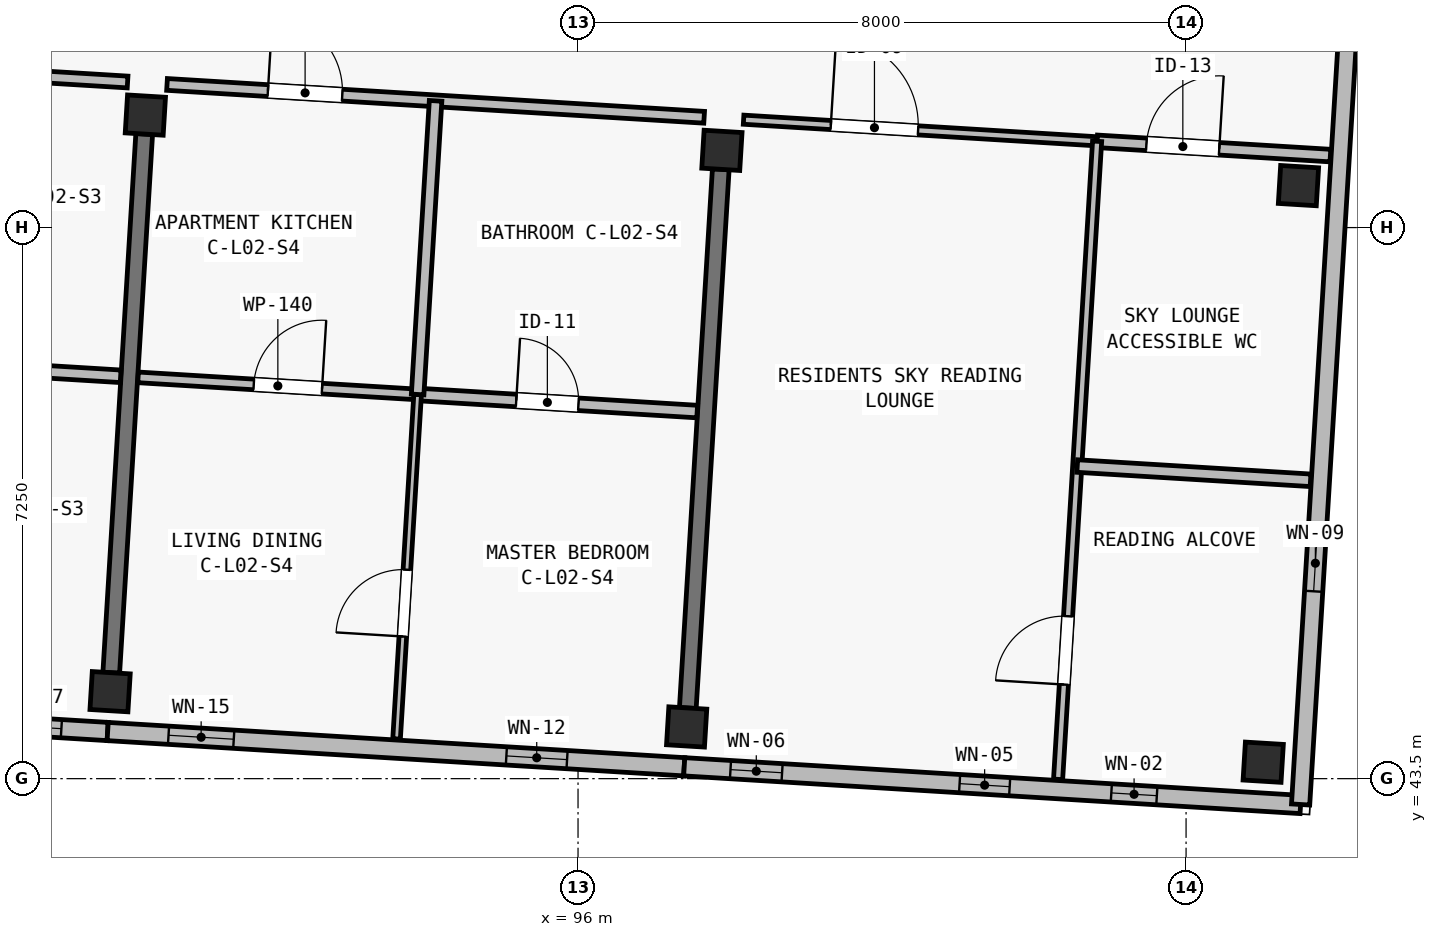
"""IFC4 building model, lengths in metres.
Left out: names, types, materials, properties, quantities, classifications, styles, units other than length and angle.
Written with IfcOpenShell. Run it as: python <this file> out.ifc"""

import sys

from ifc_helpers import new_model, si_unit, direction, frame, frame_2d, origin, origin_2d, place, context, subcontext, project, spatial, rectangle, extrude, element, fill, save


model = new_model("IFC4")
c1 = context("Model", 3, precision=1e-05, world=origin(), true_north=direction((0.0, 1.0)))
c2 = subcontext(c1, "Body", "Model", "MODEL_VIEW")
j1 = project(units=[si_unit("LENGTHUNIT", "METRE"), si_unit("PLANEANGLEUNIT", "RADIAN")], contexts=[c1])
p1 = place(None, origin())
s1 = spatial("IfcSite", under=j1, at=p1, CompositionType="ELEMENT")
p2 = place(p1, origin())
s2 = spatial("IfcBuilding", under=s1, at=p2, CompositionType="ELEMENT")
p3 = place(p2, frame((0.0, 0.0, 8.4)))
s3 = spatial("IfcBuildingStorey", under=s2, at=p3, CompositionType="ELEMENT", Elevation=8.4)
for number, where, z_axis, x_axis in (
    (1, (89.843, 44.644, 0.0), (0.0, 0.0, 1.0), (0.998, -0.061, 0.0)),
    (2, (90.307, 52.23, 0.0), (0.0, 0.0, 1.0), (0.998, -0.061, 0.0)),
    (3, (97.429, 44.18, 0.0), (0.0, 0.0, 1.0), (0.998, -0.061, 0.0)),
    (4, (97.893, 51.766, 0.0), (0.0, 0.0, 1.0), (0.998, -0.061, 0.0)),
    (5, (105.015, 43.716, 0.0), (0.0, 0.0, 1.0), (0.998, -0.061, 0.0)),
    (6, (105.479, 51.302, 0.0), (0.0, 0.0, 1.0), (0.998, -0.061, 0.0)),
):
    element("IfcColumn", number, at=place(p3, frame(where, z_axis=z_axis, x_axis=x_axis)), inside=s3, PredefinedType="COLUMN", context=c2, shape_type="SweptSolid", body=[
        extrude(rectangle(XDim=0.5, YDim=0.5, at=origin_2d()), origin(), (0.0, 0.0, 1.0), 3.25),
    ])
p4 = place(p3, frame((89.859, 44.894, 0.0), z_axis=(0.0, 0.0, 1.0), x_axis=(0.061033859059, 0.99813569621, 0.0)))
e7 = element("IfcWall", 7, at=p4, inside=s3, PredefinedType="SHEAR", context=c2, shape_type="SweptSolid", body=[
    extrude(rectangle(XDim=7.1, YDim=0.22, at=frame_2d((3.55, 0.0))), origin(), (0.0, 0.0, 1.0), 2.5),
])
p5 = place(p3, frame((97.444, 44.43, 0.0), z_axis=(0.0, 0.0, 1.0), x_axis=(0.061070212127, 0.998133472633, 0.0)))
e8 = element("IfcWall", 8, at=p5, inside=s3, PredefinedType="SHEAR", context=c2, shape_type="SweptSolid", body=[
    extrude(rectangle(XDim=7.1, YDim=0.22, at=frame_2d((3.55, 0.0))), origin(), (0.0, 0.0, 1.0), 2.5),
])
p6 = place(p3, frame((89.811, 44.12, 0.0), z_axis=(0.0, 0.0, 1.0), x_axis=(-0.998135669243, 0.061034300063, 0.0)))
e9 = element("IfcWall", 9, at=p6, inside=s3, PredefinedType="SOLIDWALL", context=c2, shape_type="SweptSolid", body=[
    extrude(rectangle(XDim=7.6, YDim=0.24, at=frame_2d((3.8, 0.0))), origin(), (0.0, 0.0, 1.0), 3.0),
])
p7 = place(p6, frame((0.61, 0.0, 0.5)))
e10 = element("IfcOpeningElement", 10, at=p7, cuts=e9, PredefinedType="OPENING", context=c2, shape_type="SweptSolid", body=[
    extrude(rectangle(XDim=0.7, YDim=2.36, at=frame_2d((0.35, 1.18))), frame((0.0, 0.135, 0.0), z_axis=(0.0, -1.0, 0.0), x_axis=(1.0, 0.0, 0.0)), (0.0, 0.0, 1.0), 0.27),
])
p8 = place(p6, frame((2.032, 0.0, 0.42)))
e11 = element("IfcOpeningElement", 11, at=p8, cuts=e9, PredefinedType="OPENING", context=c2, shape_type="SweptSolid", body=[
    extrude(rectangle(XDim=0.72, YDim=2.16, at=frame_2d((0.36, 1.08))), frame((0.0, 0.135, 0.0), z_axis=(0.0, -1.0, 0.0), x_axis=(1.0, 0.0, 0.0)), (0.0, 0.0, 1.0), 0.27),
])
p9 = place(p6, frame((5.809, 0.0, 0.52)))
e12 = element("IfcOpeningElement", 12, at=p9, cuts=e9, PredefinedType="OPENING", context=c2, shape_type="SweptSolid", body=[
    extrude(rectangle(XDim=0.76, YDim=2.34, at=frame_2d((0.38, 1.17))), frame((0.0, 0.135, 0.0), z_axis=(0.0, -1.0, 0.0), x_axis=(1.0, 0.0, 0.0)), (0.0, 0.0, 1.0), 0.27),
])
p10 = place(p3, frame((97.397, 43.656, 0.0), z_axis=(0.0, 0.0, 1.0), x_axis=(-0.998135549572, 0.061036257095, 0.0)))
e13 = element("IfcWall", 13, at=p10, inside=s3, PredefinedType="SOLIDWALL", context=c2, shape_type="SweptSolid", body=[
    extrude(rectangle(XDim=7.6, YDim=0.24, at=frame_2d((3.8, 0.0))), origin(), (0.0, 0.0, 1.0), 3.0),
])
p11 = place(p10, frame((1.544, 0.0, 0.42)))
e14 = element("IfcOpeningElement", 14, at=p11, cuts=e13, PredefinedType="OPENING", context=c2, shape_type="SweptSolid", body=[
    extrude(rectangle(XDim=0.8, YDim=2.3, at=frame_2d((0.4, 1.15))), frame((0.0, 0.135, 0.0), z_axis=(0.0, -1.0, 0.0), x_axis=(1.0, 0.0, 0.0)), (0.0, 0.0, 1.0), 0.27),
])
p12 = place(p10, frame((5.938, 0.0, 0.42)))
e15 = element("IfcOpeningElement", 15, at=p12, cuts=e13, PredefinedType="OPENING", context=c2, shape_type="SweptSolid", body=[
    extrude(rectangle(XDim=0.86, YDim=2.36, at=frame_2d((0.43, 1.18))), frame((0.0, 0.135, 0.0), z_axis=(0.0, -1.0, 0.0), x_axis=(1.0, 0.0, 0.0)), (0.0, 0.0, 1.0), 0.27),
])
p13 = place(p3, frame((105.507, 43.16, 0.0), z_axis=(0.0, 0.0, 1.0), x_axis=(-0.998134248939, 0.061057522844, 0.0)))
e16 = element("IfcWall", 16, at=p13, inside=s3, PredefinedType="SOLIDWALL", context=c2, shape_type="SweptSolid", body=[
    extrude(rectangle(XDim=8.125, YDim=0.24, at=frame_2d((4.062, 0.0))), origin(), (0.0, 0.0, 1.0), 3.0),
])
p14 = place(p13, frame((1.895, 0.0, 0.48)))
e17 = element("IfcOpeningElement", 17, at=p14, cuts=e16, PredefinedType="OPENING", context=c2, shape_type="SweptSolid", body=[
    extrude(rectangle(XDim=0.6, YDim=2.22, at=frame_2d((0.3, 1.11))), frame((0.0, 0.135, 0.0), z_axis=(0.0, -1.0, 0.0), x_axis=(1.0, 0.0, 0.0)), (0.0, 0.0, 1.0), 0.27),
])
p15 = place(p13, frame((3.835, 0.0, 0.48)))
e18 = element("IfcOpeningElement", 18, at=p15, cuts=e16, PredefinedType="OPENING", context=c2, shape_type="SweptSolid", body=[
    extrude(rectangle(XDim=0.66, YDim=2.32, at=frame_2d((0.33, 1.16))), frame((0.0, 0.135, 0.0), z_axis=(0.0, -1.0, 0.0), x_axis=(1.0, 0.0, 0.0)), (0.0, 0.0, 1.0), 0.27),
])
p16 = place(p13, frame((6.835, 0.0, 0.52)))
e19 = element("IfcOpeningElement", 19, at=p16, cuts=e16, PredefinedType="OPENING", context=c2, shape_type="SweptSolid", body=[
    extrude(rectangle(XDim=0.68, YDim=2.24, at=frame_2d((0.34, 1.12))), frame((0.0, 0.135, 0.0), z_axis=(0.0, -1.0, 0.0), x_axis=(1.0, 0.0, 0.0)), (0.0, 0.0, 1.0), 0.27),
])
p17 = place(p3, frame((106.768, 63.771, 0.0), z_axis=(0.0, 0.0, 1.0), x_axis=(-0.061053332998, -0.99813450523, 0.0)))
e20 = element("IfcWall", 20, at=p17, inside=s3, PredefinedType="SOLIDWALL", context=c2, shape_type="SweptSolid", body=[
    extrude(rectangle(XDim=20.65, YDim=0.24, at=frame_2d((10.325, 0.0))), origin(), (0.0, 0.0, 1.0), 3.0),
])
p18 = place(p17, frame((2.81, 0.0, 0.45)))
e21 = element("IfcOpeningElement", 21, at=p18, cuts=e20, PredefinedType="OPENING", context=c2, shape_type="SweptSolid", body=[
    extrude(rectangle(XDim=0.6, YDim=2.22, at=frame_2d((0.3, 1.11))), frame((0.0, 0.135, 0.0), z_axis=(0.0, -1.0, 0.0), x_axis=(1.0, 0.0, 0.0)), (0.0, 0.0, 1.0), 0.27),
])
p19 = place(p17, frame((17.1, 0.0, 0.52)))
e22 = element("IfcOpeningElement", 22, at=p19, cuts=e20, PredefinedType="OPENING", context=c2, shape_type="SweptSolid", body=[
    extrude(rectangle(XDim=0.74, YDim=2.26, at=frame_2d((0.37, 1.13))), frame((0.0, 0.135, 0.0), z_axis=(0.0, -1.0, 0.0), x_axis=(1.0, 0.0, 0.0)), (0.0, 0.0, 1.0), 0.27),
])
p20 = place(p3, frame((83.007, 53.097, 0.0), z_axis=(0.0, 0.0, 1.0), x_axis=(0.998135666539, -0.061034344288, 0.0)))
e23 = element("IfcWall", 23, at=p20, inside=s3, PredefinedType="PARTITIONING", context=c2, shape_type="SweptSolid", body=[
    extrude(rectangle(XDim=7.08, YDim=0.155, at=frame_2d((3.54, 0.0))), origin(), (0.0, 0.0, 1.0), 2.97),
])
p21 = place(p20, frame((1.33, 0.0, 0.0)))
e24 = element("IfcOpeningElement", 24, at=p21, cuts=e23, PredefinedType="OPENING", context=c2, shape_type="SweptSolid", body=[
    extrude(rectangle(XDim=1.02, YDim=2.2, at=frame_2d((0.51, 1.1))), frame((0.0, 0.093, 0.0), z_axis=(0.0, -1.0, 0.0), x_axis=(1.0, 0.0, 0.0)), (0.0, 0.0, 1.0), 0.185),
])
p22 = place(p3, frame((86.304, 49.018, 0.0), z_axis=(0.0, 0.0, 1.0), x_axis=(0.998136719672, -0.061017119263, 0.0)))
e25 = element("IfcWall", 25, at=p22, inside=s3, PredefinedType="PLUMBINGWALL", context=c2, shape_type="SweptSolid", body=[
    extrude(rectangle(XDim=3.685, YDim=0.165, at=frame_2d((1.843, 0.0))), origin(), (0.0, 0.0, 1.0), 2.97),
])
p23 = place(p22, frame((1.3, 0.0, 0.0)))
e26 = element("IfcOpeningElement", 26, at=p23, cuts=e25, PredefinedType="OPENING", context=c2, shape_type="SweptSolid", body=[
    extrude(rectangle(XDim=0.82, YDim=2.08, at=frame_2d((0.41, 1.04))), frame((0.0, 0.097, 0.0), z_axis=(0.0, -1.0, 0.0), x_axis=(1.0, 0.0, 0.0)), (0.0, 0.0, 1.0), 0.195),
])
p24 = place(p3, frame((90.593, 52.633, 0.0), z_axis=(0.0, 0.0, 1.0), x_axis=(0.998135538078, -0.061036445065, 0.0)))
e27 = element("IfcWall", 27, at=p24, inside=s3, PredefinedType="PARTITIONING", context=c2, shape_type="SweptSolid", body=[
    extrude(rectangle(XDim=7.08, YDim=0.155, at=frame_2d((3.54, 0.0))), origin(), (0.0, 0.0, 1.0), 2.97),
])
p25 = place(p24, frame((1.33, 0.0, 0.0)))
e28 = element("IfcOpeningElement", 28, at=p25, cuts=e27, PredefinedType="OPENING", context=c2, shape_type="SweptSolid", body=[
    extrude(rectangle(XDim=0.98, YDim=2.15, at=frame_2d((0.49, 1.075))), frame((0.0, 0.093, 0.0), z_axis=(0.0, -1.0, 0.0), x_axis=(1.0, 0.0, 0.0)), (0.0, 0.0, 1.0), 0.185),
])
p26 = place(p3, frame((90.211, 48.779, 0.0), z_axis=(0.0, 0.0, 1.0), x_axis=(0.998136719672, -0.061017119263, 0.0)))
e29 = element("IfcWall", 29, at=p26, inside=s3, PredefinedType="PARTITIONING", context=c2, shape_type="SweptSolid", body=[
    extrude(rectangle(XDim=3.685, YDim=0.14, at=frame_2d((1.843, 0.0))), origin(), (0.0, 0.0, 1.0), 2.97),
])
p27 = place(p26, frame((1.525, 0.0, 0.0)))
e30 = element("IfcOpeningElement", 30, at=p27, cuts=e29, PredefinedType="OPENING", context=c2, shape_type="SweptSolid", body=[
    extrude(rectangle(XDim=0.9, YDim=2.1, at=frame_2d((0.45, 1.05))), frame((0.0, 0.085, 0.0), z_axis=(0.0, -1.0, 0.0), x_axis=(1.0, 0.0, 0.0)), (0.0, 0.0, 1.0), 0.17),
])
p28 = place(p3, frame((93.89, 48.554, 0.0), z_axis=(0.0, 0.0, 1.0), x_axis=(0.99813243538, -0.061087162657, 0.0)))
e31 = element("IfcWall", 31, at=p28, inside=s3, PredefinedType="PLUMBINGWALL", context=c2, shape_type="SweptSolid", body=[
    extrude(rectangle(XDim=3.685, YDim=0.165, at=frame_2d((1.842, 0.0))), origin(), (0.0, 0.0, 1.0), 2.97),
])
p29 = place(p28, frame((1.3, 0.0, 0.0)))
e32 = element("IfcOpeningElement", 32, at=p29, cuts=e31, PredefinedType="OPENING", context=c2, shape_type="SweptSolid", body=[
    extrude(rectangle(XDim=0.82, YDim=2.08, at=frame_2d((0.41, 1.04))), frame((0.0, 0.097, 0.0), z_axis=(0.0, -1.0, 0.0), x_axis=(1.0, 0.0, 0.0)), (0.0, 0.0, 1.0), 0.195),
])
p30 = place(p3, frame((93.612, 44.023, 0.0), z_axis=(0.0, 0.0, 1.0), x_axis=(0.061089289302, 0.998132305224, 0.0)))
e33 = element("IfcWall", 33, at=p30, inside=s3, PredefinedType="PARTITIONING", context=c2, shape_type="SweptSolid", body=[
    extrude(rectangle(XDim=4.54, YDim=0.1, at=frame_2d((2.27, 0.0))), origin(), (0.0, 0.0, 1.0), 2.97),
])
p31 = place(p30, frame((1.35, 0.0, 0.0)))
e34 = element("IfcOpeningElement", 34, at=p31, cuts=e33, PredefinedType="OPENING", context=c2, shape_type="SweptSolid", body=[
    extrude(rectangle(XDim=0.88, YDim=2.1, at=frame_2d((0.44, 1.05))), frame((0.0, 0.065, 0.0), z_axis=(0.0, -1.0, 0.0), x_axis=(1.0, 0.0, 0.0)), (0.0, 0.0, 1.0), 0.13),
])
p32 = place(p3, frame((93.89, 48.554, 0.0), z_axis=(0.0, 0.0, 1.0), x_axis=(0.06100360301, 0.998137545842, 0.0)))
e35 = element("IfcWall", 35, at=p32, inside=s3, PredefinedType="PLUMBINGWALL", context=c2, shape_type="SweptSolid", body=[
    extrude(rectangle(XDim=3.87, YDim=0.165, at=frame_2d((1.935, 0.0))), origin(), (0.0, 0.0, 1.0), 2.97),
])
p33 = place(p3, frame((98.178, 52.169, 0.0), z_axis=(0.0, 0.0, 1.0), x_axis=(0.998132468034, -0.061086629106, 0.0)))
e36 = element("IfcWall", 36, at=p33, inside=s3, PredefinedType="PARTITIONING", context=c2, shape_type="SweptSolid", body=[
    extrude(rectangle(XDim=4.66, YDim=0.12, at=frame_2d((2.33, 0.0))), origin(), (0.0, 0.0, 1.0), 2.97),
])
p34 = place(p33, frame((1.15, 0.0, 0.0)))
e37 = element("IfcOpeningElement", 37, at=p34, cuts=e36, PredefinedType="OPENING", context=c2, shape_type="SweptSolid", body=[
    extrude(rectangle(XDim=1.15, YDim=2.15, at=frame_2d((0.575, 1.075))), frame((0.0, 0.075, 0.0), z_axis=(0.0, -1.0, 0.0), x_axis=(1.0, 0.0, 0.0)), (0.0, 0.0, 1.0), 0.15),
])
p35 = place(p3, frame((102.83, 51.885, 0.0), z_axis=(0.0, 0.0, 1.0), x_axis=(0.998134491017, -0.061053565351, 0.0)))
e38 = element("IfcWall", 38, at=p35, inside=s3, PredefinedType="PLUMBINGWALL", context=c2, shape_type="SweptSolid", body=[
    extrude(rectangle(XDim=3.075, YDim=0.165, at=frame_2d((1.538, 0.0))), origin(), (0.0, 0.0, 1.0), 2.97),
])
p36 = place(p35, frame((0.65, 0.0, 0.0)))
e39 = element("IfcOpeningElement", 39, at=p36, cuts=e38, PredefinedType="OPENING", context=c2, shape_type="SweptSolid", body=[
    extrude(rectangle(XDim=0.96, YDim=2.12, at=frame_2d((0.48, 1.06))), frame((0.0, 0.097, 0.0), z_axis=(0.0, -1.0, 0.0), x_axis=(1.0, 0.0, 0.0)), (0.0, 0.0, 1.0), 0.195),
])
p37 = place(p3, frame((102.316, 43.49, 0.0), z_axis=(0.0, 0.0, 1.0), x_axis=(0.061049859271, 0.998134717702, 0.0)))
e40 = element("IfcWall", 40, at=p37, inside=s3, PredefinedType="PARTITIONING", context=c2, shape_type="SweptSolid", body=[
    extrude(rectangle(XDim=8.41, YDim=0.12, at=frame_2d((4.205, 0.0))), origin(), (0.0, 0.0, 1.0), 2.97),
])
p38 = place(p37, frame((1.25, 0.0, 0.0)))
e41 = element("IfcOpeningElement", 41, at=p38, cuts=e40, PredefinedType="OPENING", context=c2, shape_type="SweptSolid", body=[
    extrude(rectangle(XDim=0.9, YDim=2.1, at=frame_2d((0.45, 1.05))), frame((0.0, 0.075, 0.0), z_axis=(0.0, -1.0, 0.0), x_axis=(1.0, 0.0, 0.0)), (0.0, 0.0, 1.0), 0.15),
])
p39 = place(p3, frame((102.568, 47.613, 0.0), z_axis=(0.0, 0.0, 1.0), x_axis=(0.99813419504, -0.061058403944, 0.0)))
e42 = element("IfcWall", 42, at=p39, inside=s3, PredefinedType="PLUMBINGWALL", context=c2, shape_type="SweptSolid", body=[
    extrude(rectangle(XDim=3.075, YDim=0.165, at=frame_2d((1.537, 0.0))), origin(), (0.0, 0.0, 1.0), 2.97),
])
p40 = place(p7, origin())
e43 = element("IfcWindow", 43, at=p40, inside=s3, PartitioningType="SINGLE_PANEL", PredefinedType="WINDOW", context=c2, shape_type="SweptSolid", body=[
    extrude(rectangle(XDim=0.7, YDim=2.36, at=frame_2d((0.35, 1.18))), frame((0.0, 0.03, 0.0), z_axis=(0.0, -1.0, 0.0), x_axis=(1.0, 0.0, 0.0)), (0.0, 0.0, 1.0), 0.06),
])
fill(e10, e43)
p41 = place(p11, origin())
e44 = element("IfcWindow", 44, at=p41, inside=s3, PartitioningType="SINGLE_PANEL", PredefinedType="WINDOW", context=c2, shape_type="SweptSolid", body=[
    extrude(rectangle(XDim=0.8, YDim=2.3, at=frame_2d((0.4, 1.15))), frame((0.0, 0.03, 0.0), z_axis=(0.0, -1.0, 0.0), x_axis=(1.0, 0.0, 0.0)), (0.0, 0.0, 1.0), 0.06),
])
fill(e14, e44)
p42 = place(p12, origin())
e45 = element("IfcWindow", 45, at=p42, inside=s3, PartitioningType="SINGLE_PANEL", PredefinedType="WINDOW", context=c2, shape_type="SweptSolid", body=[
    extrude(rectangle(XDim=0.86, YDim=2.36, at=frame_2d((0.43, 1.18))), frame((0.0, 0.03, 0.0), z_axis=(0.0, -1.0, 0.0), x_axis=(1.0, 0.0, 0.0)), (0.0, 0.0, 1.0), 0.06),
])
fill(e15, e45)
p43 = place(p14, origin())
e46 = element("IfcWindow", 46, at=p43, inside=s3, PartitioningType="SINGLE_PANEL", PredefinedType="WINDOW", context=c2, shape_type="SweptSolid", body=[
    extrude(rectangle(XDim=0.6, YDim=2.22, at=frame_2d((0.3, 1.11))), frame((0.0, 0.03, 0.0), z_axis=(0.0, -1.0, 0.0), x_axis=(1.0, 0.0, 0.0)), (0.0, 0.0, 1.0), 0.06),
])
fill(e17, e46)
p44 = place(p15, origin())
e47 = element("IfcWindow", 47, at=p44, inside=s3, PartitioningType="SINGLE_PANEL", PredefinedType="WINDOW", context=c2, shape_type="SweptSolid", body=[
    extrude(rectangle(XDim=0.66, YDim=2.32, at=frame_2d((0.33, 1.16))), frame((0.0, 0.03, 0.0), z_axis=(0.0, -1.0, 0.0), x_axis=(1.0, 0.0, 0.0)), (0.0, 0.0, 1.0), 0.06),
])
fill(e18, e47)
p45 = place(p16, origin())
e48 = element("IfcWindow", 48, at=p45, inside=s3, PartitioningType="SINGLE_PANEL", PredefinedType="WINDOW", context=c2, shape_type="SweptSolid", body=[
    extrude(rectangle(XDim=0.68, YDim=2.24, at=frame_2d((0.34, 1.12))), frame((0.0, 0.03, 0.0), z_axis=(0.0, -1.0, 0.0), x_axis=(1.0, 0.0, 0.0)), (0.0, 0.0, 1.0), 0.06),
])
fill(e19, e48)
p46 = place(p19, origin())
e49 = element("IfcWindow", 49, at=p46, inside=s3, PartitioningType="SINGLE_PANEL", PredefinedType="WINDOW", context=c2, shape_type="SweptSolid", body=[
    extrude(rectangle(XDim=0.74, YDim=2.26, at=frame_2d((0.37, 1.13))), frame((0.0, 0.03, 0.0), z_axis=(0.0, -1.0, 0.0), x_axis=(1.0, 0.0, 0.0)), (0.0, 0.0, 1.0), 0.06),
])
fill(e22, e49)
p47 = place(p25, origin())
e50 = element("IfcDoor", 50, at=p47, inside=s3, OperationType="SINGLE_SWING_LEFT", PredefinedType="DOOR", context=c2, shape_type="SweptSolid", body=[
    extrude(rectangle(XDim=0.98, YDim=2.15, at=frame_2d((0.49, 1.075))), frame((0.0, 0.025, 0.0), z_axis=(0.0, -1.0, 0.0), x_axis=(1.0, 0.0, 0.0)), (0.0, 0.0, 1.0), 0.05),
])
fill(e28, e50)
p48 = place(p27, origin())
e51 = element("IfcDoor", 51, at=p48, inside=s3, OperationType="SINGLE_SWING_RIGHT", PredefinedType="DOOR", context=c2, shape_type="SweptSolid", body=[
    extrude(rectangle(XDim=0.9, YDim=2.1, at=frame_2d((0.45, 1.05))), frame((0.0, 0.025, 0.0), z_axis=(0.0, -1.0, 0.0), x_axis=(1.0, 0.0, 0.0)), (0.0, 0.0, 1.0), 0.05),
])
fill(e30, e51)
p49 = place(p29, origin())
e52 = element("IfcDoor", 52, at=p49, inside=s3, OperationType="SINGLE_SWING_LEFT", PredefinedType="DOOR", context=c2, shape_type="SweptSolid", body=[
    extrude(rectangle(XDim=0.82, YDim=2.08, at=frame_2d((0.41, 1.04))), frame((0.0, 0.025, 0.0), z_axis=(0.0, -1.0, 0.0), x_axis=(1.0, 0.0, 0.0)), (0.0, 0.0, 1.0), 0.05),
])
fill(e32, e52)
p50 = place(p31, origin())
e53 = element("IfcDoor", 53, at=p50, inside=s3, OperationType="SINGLE_SWING_LEFT", PredefinedType="DOOR", context=c2, shape_type="SweptSolid", body=[
    extrude(rectangle(XDim=0.88, YDim=2.1, at=frame_2d((0.44, 1.05))), frame((0.0, 0.025, 0.0), z_axis=(0.0, -1.0, 0.0), x_axis=(1.0, 0.0, 0.0)), (0.0, 0.0, 1.0), 0.05),
])
fill(e34, e53)
p51 = place(p34, origin())
e54 = element("IfcDoor", 54, at=p51, inside=s3, OperationType="SINGLE_SWING_LEFT", PredefinedType="DOOR", context=c2, shape_type="SweptSolid", body=[
    extrude(rectangle(XDim=1.15, YDim=2.15, at=frame_2d((0.575, 1.075))), frame((0.0, 0.025, 0.0), z_axis=(0.0, -1.0, 0.0), x_axis=(1.0, 0.0, 0.0)), (0.0, 0.0, 1.0), 0.05),
])
fill(e37, e54)
p52 = place(p36, origin())
e55 = element("IfcDoor", 55, at=p52, inside=s3, OperationType="SINGLE_SWING_RIGHT", PredefinedType="DOOR", context=c2, shape_type="SweptSolid", body=[
    extrude(rectangle(XDim=0.96, YDim=2.12, at=frame_2d((0.48, 1.06))), frame((0.0, 0.025, 0.0), z_axis=(0.0, -1.0, 0.0), x_axis=(1.0, 0.0, 0.0)), (0.0, 0.0, 1.0), 0.05),
])
fill(e39, e55)
p53 = place(p38, origin())
e56 = element("IfcDoor", 56, at=p53, inside=s3, OperationType="SINGLE_SWING_LEFT", PredefinedType="DOOR", context=c2, shape_type="SweptSolid", body=[
    extrude(rectangle(XDim=0.9, YDim=2.1, at=frame_2d((0.45, 1.05))), frame((0.0, 0.025, 0.0), z_axis=(0.0, -1.0, 0.0), x_axis=(1.0, 0.0, 0.0)), (0.0, 0.0, 1.0), 0.05),
])
fill(e41, e56)
save(model, sys.argv[1])
